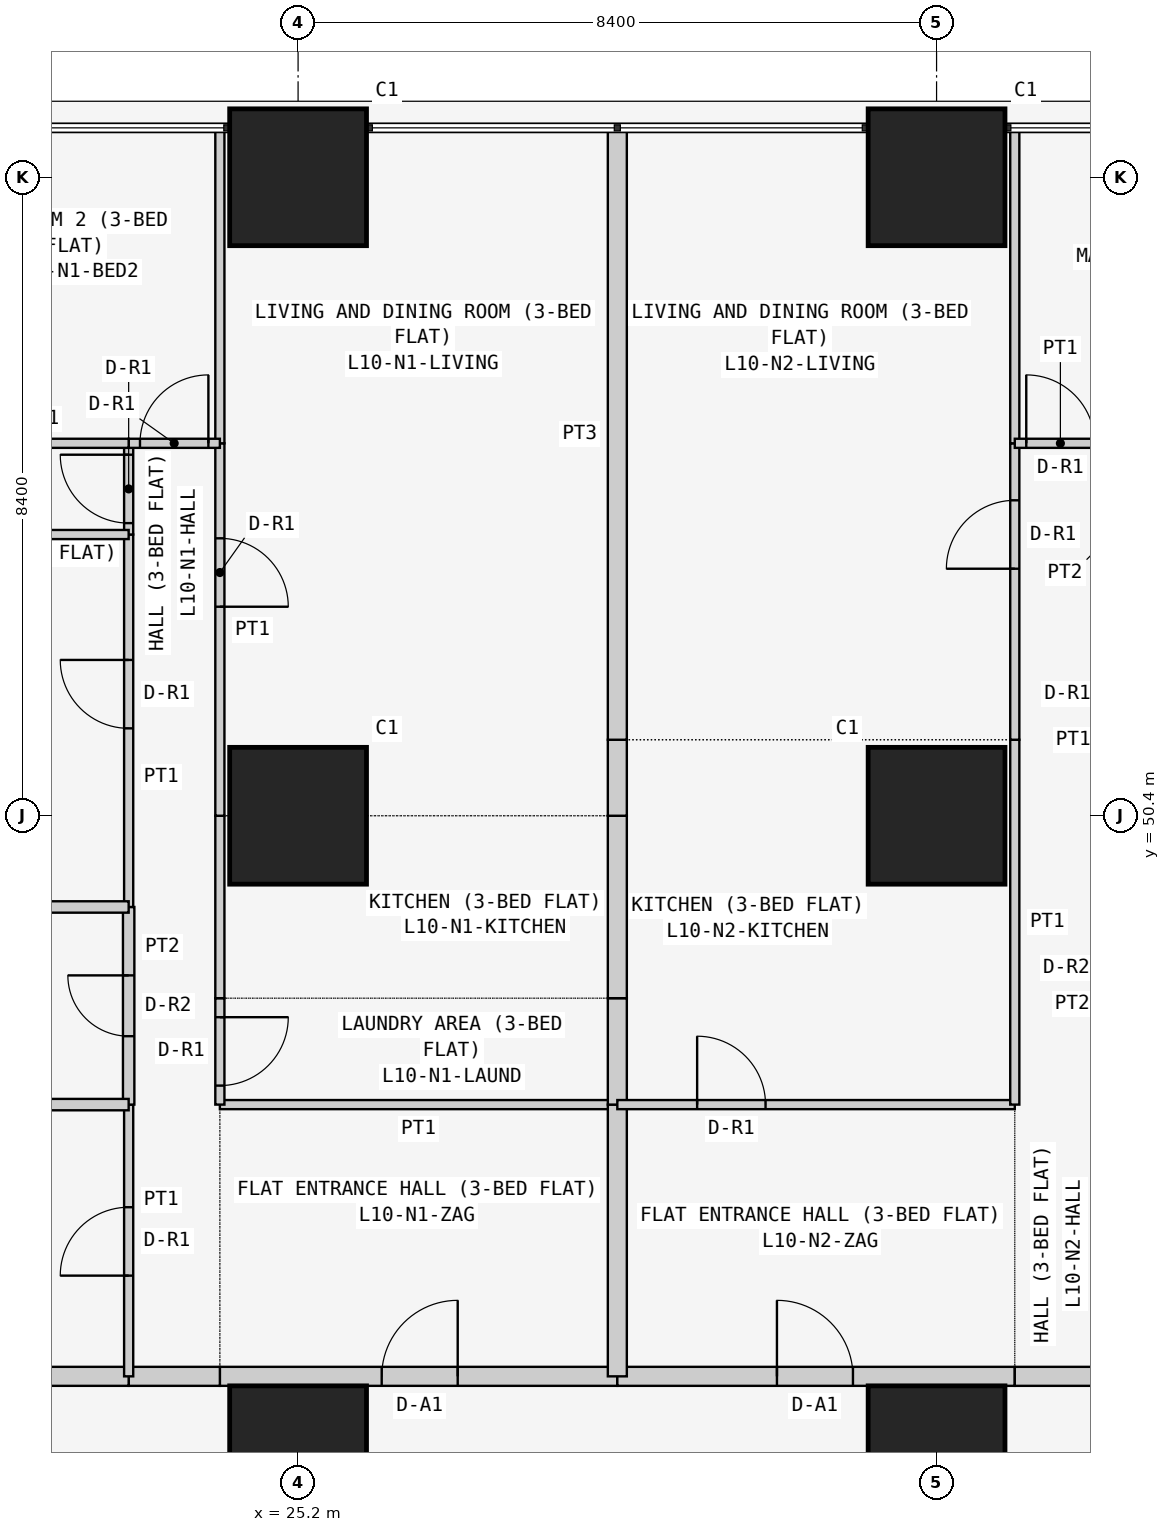
"""IFC4 building model, lengths in metres.
Left out: names, types, materials, properties, quantities, classifications, styles, units other than length and angle.
Written with IfcOpenShell. Run it as: python <this file> out.ifc"""

import sys

from ifc_helpers import new_model, si_unit, direction, frame, frame_2d, origin, origin_2d, place, context, subcontext, project, spatial, rectangle, extrude, element, fill, save


model = new_model("IFC4")
c1 = context("Model", 3, precision=1e-05, world=origin(), true_north=direction((0.0, 1.0)))
c2 = subcontext(c1, "Body", "Model", "MODEL_VIEW")
j1 = project(units=[si_unit("LENGTHUNIT", "METRE"), si_unit("PLANEANGLEUNIT", "RADIAN")], contexts=[c1])
p1 = place(None, origin())
s1 = spatial("IfcSite", under=j1, at=p1, CompositionType="ELEMENT")
p2 = place(p1, origin())
s2 = spatial("IfcBuilding", under=s1, at=p2, CompositionType="ELEMENT")
p3 = place(p2, frame((0.0, 0.0, 45.3)))
s3 = spatial("IfcBuildingStorey", under=s2, at=p3, CompositionType="ELEMENT", Elevation=45.3)
for number, where, z_axis, x_axis in (
    (1, (25.2, 42.0, 0.0), (0.0, 0.0, 1.0), (1.0, 0.0, 0.0)),
    (2, (25.2, 50.4, 0.0), (0.0, 0.0, 1.0), (1.0, 0.0, 0.0)),
    (3, (25.2, 58.8, 0.0), (0.0, 0.0, 1.0), (1.0, 0.0, 0.0)),
    (4, (33.6, 42.0, 0.0), (0.0, 0.0, 1.0), (1.0, 0.0, 0.0)),
    (5, (33.6, 50.4, 0.0), (0.0, 0.0, 1.0), (1.0, 0.0, 0.0)),
    (6, (33.6, 58.8, 0.0), (0.0, 0.0, 1.0), (1.0, 0.0, 0.0)),
):
    element("IfcColumn", number, at=place(p3, frame(where, z_axis=z_axis, x_axis=x_axis)), inside=s3, PredefinedType="COLUMN", context=c2, shape_type="SweptSolid", body=[
        extrude(rectangle(XDim=1.8, YDim=1.8, at=origin_2d()), origin(), (0.0, 0.0, 1.0), 3.6),
    ])
p4 = place(p3, frame((24.171, 43.025, 0.0), z_axis=(0.0, 0.0, 1.0), x_axis=(1.0, 0.0, 0.0)))
e7 = element("IfcWall", 7, at=p4, inside=s3, PredefinedType="PARTITIONING", context=c2, shape_type="SweptSolid", body=[
    extrude(rectangle(XDim=5.229, YDim=0.25, at=frame_2d((2.615, 0.0))), origin(), (0.0, 0.0, 1.0), 3.45),
])
p5 = place(p4, frame((2.129, 0.0, 0.0)))
e8 = element("IfcOpeningElement", 8, at=p5, cuts=e7, PredefinedType="OPENING", context=c2, shape_type="SweptSolid", body=[
    extrude(rectangle(XDim=1.0, YDim=2.1, at=frame_2d((0.5, 1.05))), frame((0.0, 0.135, 0.0), z_axis=(0.0, -1.0, 0.0), x_axis=(1.0, 0.0, 0.0)), (0.0, 0.0, 1.0), 0.27),
])
p6 = place(p3, frame((22.971, 43.025, 0.0), z_axis=(0.0, 0.0, 1.0), x_axis=(1.0, 0.0, 0.0)))
e9 = element("IfcWall", 9, at=p6, inside=s3, PredefinedType="PARTITIONING", context=c2, shape_type="SweptSolid", body=[
    extrude(rectangle(XDim=1.2, YDim=0.25, at=frame_2d((0.6, 0.0))), origin(), (0.0, 0.0, 1.0), 3.45),
])
p7 = place(p3, frame((16.1, 43.025, 0.0), z_axis=(0.0, 0.0, 1.0), x_axis=(1.0, 0.0, 0.0)))
e10 = element("IfcWall", 10, at=p7, inside=s3, PredefinedType="PARTITIONING", context=c2, shape_type="SweptSolid", body=[
    extrude(rectangle(XDim=6.871, YDim=0.25, at=frame_2d((3.436, 0.0))), origin(), (0.0, 0.0, 1.0), 3.45),
])
p8 = place(p3, frame((29.4, 43.025, 0.0), z_axis=(0.0, 0.0, 1.0), x_axis=(1.0, 0.0, 0.0)))
e11 = element("IfcWall", 11, at=p8, inside=s3, PredefinedType="PARTITIONING", context=c2, shape_type="SweptSolid", body=[
    extrude(rectangle(XDim=5.229, YDim=0.25, at=frame_2d((2.615, 0.0))), origin(), (0.0, 0.0, 1.0), 3.45),
])
p9 = place(p8, frame((2.1, 0.0, 0.0)))
e12 = element("IfcOpeningElement", 12, at=p9, cuts=e11, PredefinedType="OPENING", context=c2, shape_type="SweptSolid", body=[
    extrude(rectangle(XDim=1.0, YDim=2.1, at=frame_2d((0.5, 1.05))), frame((0.0, 0.135, 0.0), z_axis=(0.0, -1.0, 0.0), x_axis=(1.0, 0.0, 0.0)), (0.0, 0.0, 1.0), 0.27),
])
p10 = place(p3, frame((34.629, 43.025, 0.0), z_axis=(0.0, 0.0, 1.0), x_axis=(1.0, 0.0, 0.0)))
e13 = element("IfcWall", 13, at=p10, inside=s3, PredefinedType="PARTITIONING", context=c2, shape_type="SweptSolid", body=[
    extrude(rectangle(XDim=1.2, YDim=0.25, at=frame_2d((0.6, 0.0))), origin(), (0.0, 0.0, 1.0), 3.45),
])
p11 = place(p3, frame((29.4, 46.6, 0.0), z_axis=(0.0, 0.0, 1.0), x_axis=(-1.0, 0.0, 0.0)))
e14 = element("IfcWall", 14, at=p11, inside=s3, PredefinedType="PARTITIONING", context=c2, shape_type="SweptSolid", body=[
    extrude(rectangle(XDim=5.229, YDim=0.12, at=frame_2d((2.615, 0.0))), origin(), (0.0, 0.0, 1.0), 3.45),
])
p12 = place(p3, frame((29.4, 43.025, 0.0), z_axis=(0.0, 0.0, 1.0), x_axis=(0.0, 1.0, 0.0)))
e15 = element("IfcWall", 15, at=p12, inside=s3, PredefinedType="PARTITIONING", context=c2, shape_type="SweptSolid", body=[
    extrude(rectangle(XDim=3.575, YDim=0.25, at=frame_2d((1.788, 0.0))), origin(), (0.0, 0.0, 1.0), 2.848),
])
p13 = place(p3, frame((24.171, 48.0, 0.0), z_axis=(0.0, 0.0, 1.0), x_axis=(0.0, -1.0, 0.0)))
e16 = element("IfcWall", 16, at=p13, inside=s3, PredefinedType="PARTITIONING", context=c2, shape_type="SweptSolid", body=[
    extrude(rectangle(XDim=1.4, YDim=0.12, at=frame_2d((0.7, 0.0))), origin(), (0.0, 0.0, 1.0), 3.45),
])
p14 = place(p13, frame((0.25, 0.0, 0.0)))
e17 = element("IfcOpeningElement", 17, at=p14, cuts=e16, PredefinedType="OPENING", context=c2, shape_type="SweptSolid", body=[
    extrude(rectangle(XDim=0.9, YDim=2.1, at=frame_2d((0.45, 1.05))), frame((0.0, 0.07, 0.0), z_axis=(0.0, -1.0, 0.0), x_axis=(1.0, 0.0, 0.0)), (0.0, 0.0, 1.0), 0.14),
])
p15 = place(p3, frame((29.4, 46.6, 0.0), z_axis=(0.0, 0.0, 1.0), x_axis=(0.0, 1.0, 0.0)))
e18 = element("IfcWall", 18, at=p15, inside=s3, PredefinedType="PARTITIONING", context=c2, shape_type="SweptSolid", body=[
    extrude(rectangle(XDim=1.4, YDim=0.25, at=frame_2d((0.7, 0.0))), origin(), (0.0, 0.0, 1.0), 2.848),
])
p16 = place(p3, frame((24.171, 50.4, 0.0), z_axis=(0.0, 0.0, 1.0), x_axis=(0.0, -1.0, 0.0)))
e19 = element("IfcWall", 19, at=p16, inside=s3, PredefinedType="PARTITIONING", context=c2, shape_type="SweptSolid", body=[
    extrude(rectangle(XDim=2.4, YDim=0.12, at=frame_2d((1.2, 0.0))), origin(), (0.0, 0.0, 1.0), 3.45),
])
p17 = place(p3, frame((29.4, 48.0, 0.0), z_axis=(0.0, 0.0, 1.0), x_axis=(0.0, 1.0, 0.0)))
e20 = element("IfcWall", 20, at=p17, inside=s3, PredefinedType="PARTITIONING", context=c2, shape_type="SweptSolid", body=[
    extrude(rectangle(XDim=2.4, YDim=0.25, at=frame_2d((1.2, 0.0))), origin(), (0.0, 0.0, 1.0), 2.848),
])
p18 = place(p3, frame((24.171, 55.3, 0.0), z_axis=(0.0, 0.0, 1.0), x_axis=(0.0, -1.0, 0.0)))
e21 = element("IfcWall", 21, at=p18, inside=s3, PredefinedType="PARTITIONING", context=c2, shape_type="SweptSolid", body=[
    extrude(rectangle(XDim=4.9, YDim=0.12, at=frame_2d((2.45, 0.0))), origin(), (0.0, 0.0, 1.0), 3.45),
])
p19 = place(p18, frame((1.25, 0.0, 0.0)))
e22 = element("IfcOpeningElement", 22, at=p19, cuts=e21, PredefinedType="OPENING", context=c2, shape_type="SweptSolid", body=[
    extrude(rectangle(XDim=0.9, YDim=2.1, at=frame_2d((0.45, 1.05))), frame((0.0, 0.07, 0.0), z_axis=(0.0, -1.0, 0.0), x_axis=(1.0, 0.0, 0.0)), (0.0, 0.0, 1.0), 0.14),
])
p20 = place(p3, frame((24.171, 59.45, 0.0), z_axis=(0.0, 0.0, 1.0), x_axis=(0.0, -1.0, 0.0)))
e23 = element("IfcWall", 23, at=p20, inside=s3, PredefinedType="PARTITIONING", context=c2, shape_type="SweptSolid", body=[
    extrude(rectangle(XDim=4.15, YDim=0.12, at=frame_2d((2.075, 0.0))), origin(), (0.0, 0.0, 1.0), 3.45),
])
p21 = place(p3, frame((29.4, 50.4, 0.0), z_axis=(0.0, 0.0, 1.0), x_axis=(0.0, 1.0, 0.0)))
e24 = element("IfcWall", 24, at=p21, inside=s3, PredefinedType="PARTITIONING", context=c2, shape_type="SweptSolid", body=[
    extrude(rectangle(XDim=1.0, YDim=0.25, at=frame_2d((0.5, 0.0))), origin(), (0.0, 0.0, 1.0), 2.848),
])
p22 = place(p3, frame((29.4, 51.4, 0.0), z_axis=(0.0, 0.0, 1.0), x_axis=(0.0, 1.0, 0.0)))
e25 = element("IfcWall", 25, at=p22, inside=s3, PredefinedType="PARTITIONING", context=c2, shape_type="SweptSolid", body=[
    extrude(rectangle(XDim=8.05, YDim=0.25, at=frame_2d((4.025, 0.0))), origin(), (0.0, 0.0, 1.0), 2.848),
])
p23 = place(p3, frame((22.971, 46.6, 0.0), z_axis=(0.0, 0.0, 1.0), x_axis=(0.0, -1.0, 0.0)))
e26 = element("IfcWall", 26, at=p23, inside=s3, PredefinedType="PARTITIONING", context=c2, shape_type="SweptSolid", body=[
    extrude(rectangle(XDim=3.575, YDim=0.12, at=frame_2d((1.788, 0.0))), origin(), (0.0, 0.0, 1.0), 3.45),
])
p24 = place(p23, frame((1.35, 0.0, 0.0)))
e27 = element("IfcOpeningElement", 27, at=p24, cuts=e26, PredefinedType="OPENING", context=c2, shape_type="SweptSolid", body=[
    extrude(rectangle(XDim=0.9, YDim=2.1, at=frame_2d((0.45, 1.05))), frame((0.0, 0.07, 0.0), z_axis=(0.0, -1.0, 0.0), x_axis=(1.0, 0.0, 0.0)), (0.0, 0.0, 1.0), 0.14),
])
p25 = place(p3, frame((22.971, 49.2, 0.0), z_axis=(0.0, 0.0, 1.0), x_axis=(0.0, -1.0, 0.0)))
e28 = element("IfcWall", 28, at=p25, inside=s3, PredefinedType="PARTITIONING", context=c2, shape_type="SweptSolid", body=[
    extrude(rectangle(XDim=2.6, YDim=0.15, at=frame_2d((1.3, 0.0))), origin(), (0.0, 0.0, 1.0), 3.45),
])
p26 = place(p25, frame((0.9, 0.0, 0.0)))
e29 = element("IfcOpeningElement", 29, at=p26, cuts=e28, PredefinedType="OPENING", context=c2, shape_type="SweptSolid", body=[
    extrude(rectangle(XDim=0.8, YDim=2.1, at=frame_2d((0.4, 1.05))), frame((0.0, 0.085, 0.0), z_axis=(0.0, -1.0, 0.0), x_axis=(1.0, 0.0, 0.0)), (0.0, 0.0, 1.0), 0.17),
])
p27 = place(p3, frame((22.971, 54.1, 0.0), z_axis=(0.0, 0.0, 1.0), x_axis=(0.0, -1.0, 0.0)))
e30 = element("IfcWall", 30, at=p27, inside=s3, PredefinedType="PARTITIONING", context=c2, shape_type="SweptSolid", body=[
    extrude(rectangle(XDim=4.9, YDim=0.12, at=frame_2d((2.45, 0.0))), origin(), (0.0, 0.0, 1.0), 3.45),
])
p28 = place(p27, frame((1.65, 0.0, 0.0)))
e31 = element("IfcOpeningElement", 31, at=p28, cuts=e30, PredefinedType="OPENING", context=c2, shape_type="SweptSolid", body=[
    extrude(rectangle(XDim=0.9, YDim=2.1, at=frame_2d((0.45, 1.05))), frame((0.0, 0.07, 0.0), z_axis=(0.0, -1.0, 0.0), x_axis=(1.0, 0.0, 0.0)), (0.0, 0.0, 1.0), 0.14),
])
p29 = place(p3, frame((22.971, 55.3, 0.0), z_axis=(0.0, 0.0, 1.0), x_axis=(0.0, -1.0, 0.0)))
e32 = element("IfcWall", 32, at=p29, inside=s3, PredefinedType="PARTITIONING", context=c2, shape_type="SweptSolid", body=[
    extrude(rectangle(XDim=1.2, YDim=0.12, at=frame_2d((0.6, 0.0))), origin(), (0.0, 0.0, 1.0), 3.45),
])
p30 = place(p29, frame((0.15, 0.0, 0.0)))
e33 = element("IfcOpeningElement", 33, at=p30, cuts=e32, PredefinedType="OPENING", context=c2, shape_type="SweptSolid", body=[
    extrude(rectangle(XDim=0.9, YDim=2.1, at=frame_2d((0.45, 1.05))), frame((0.0, 0.07, 0.0), z_axis=(0.0, -1.0, 0.0), x_axis=(1.0, 0.0, 0.0)), (0.0, 0.0, 1.0), 0.14),
])
p31 = place(p3, frame((24.171, 55.3, 0.0), z_axis=(0.0, 0.0, 1.0), x_axis=(-1.0, 0.0, 0.0)))
e34 = element("IfcWall", 34, at=p31, inside=s3, PredefinedType="PARTITIONING", context=c2, shape_type="SweptSolid", body=[
    extrude(rectangle(XDim=1.2, YDim=0.12, at=frame_2d((0.6, 0.0))), origin(), (0.0, 0.0, 1.0), 3.45),
])
p32 = place(p31, frame((0.151, 0.0, 0.0)))
e35 = element("IfcOpeningElement", 35, at=p32, cuts=e34, PredefinedType="OPENING", context=c2, shape_type="SweptSolid", body=[
    extrude(rectangle(XDim=0.9, YDim=2.1, at=frame_2d((0.45, 1.05))), frame((0.0, 0.07, 0.0), z_axis=(0.0, -1.0, 0.0), x_axis=(1.0, 0.0, 0.0)), (0.0, 0.0, 1.0), 0.14),
])
for number, where, z_axis, x_axis in (
    (36, (22.971, 46.6, 0.0), (0.0, 0.0, 1.0), (-1.0, 0.0, 0.0)),
    (37, (22.971, 49.2, 0.0), (0.0, 0.0, 1.0), (-1.0, 0.0, 0.0)),
):
    element("IfcWall", number, at=place(p3, frame(where, z_axis=z_axis, x_axis=x_axis)), inside=s3, PredefinedType="PARTITIONING", context=c2, shape_type="SweptSolid", body=[
        extrude(rectangle(XDim=2.971, YDim=0.15, at=frame_2d((1.485, 0.0))), origin(), (0.0, 0.0, 1.0), 3.45),
    ])
for number, where, z_axis, x_axis in (
    (38, (22.971, 54.1, 0.0), (0.0, 0.0, 1.0), (-1.0, 0.0, 0.0)),
    (39, (22.971, 55.3, 0.0), (0.0, 0.0, 1.0), (-1.0, 0.0, 0.0)),
):
    element("IfcWall", number, at=place(p3, frame(where, z_axis=z_axis, x_axis=x_axis)), inside=s3, PredefinedType="PARTITIONING", context=c2, shape_type="SweptSolid", body=[
        extrude(rectangle(XDim=2.285, YDim=0.12, at=frame_2d((1.143, 0.0))), origin(), (0.0, 0.0, 1.0), 3.45),
    ])
p33 = place(p3, frame((29.4, 46.6, 0.0), z_axis=(0.0, 0.0, 1.0), x_axis=(1.0, 0.0, 0.0)))
e40 = element("IfcWall", 40, at=p33, inside=s3, PredefinedType="PARTITIONING", context=c2, shape_type="SweptSolid", body=[
    extrude(rectangle(XDim=5.229, YDim=0.12, at=frame_2d((2.615, 0.0))), origin(), (0.0, 0.0, 1.0), 3.45),
])
p34 = place(p33, frame((1.05, 0.0, 0.0)))
e41 = element("IfcOpeningElement", 41, at=p34, cuts=e40, PredefinedType="OPENING", context=c2, shape_type="SweptSolid", body=[
    extrude(rectangle(XDim=0.9, YDim=2.1, at=frame_2d((0.45, 1.05))), frame((0.0, 0.07, 0.0), z_axis=(0.0, -1.0, 0.0), x_axis=(1.0, 0.0, 0.0)), (0.0, 0.0, 1.0), 0.14),
])
p35 = place(p3, frame((34.629, 51.4, 0.0), z_axis=(0.0, 0.0, 1.0), x_axis=(0.0, -1.0, 0.0)))
e42 = element("IfcWall", 42, at=p35, inside=s3, PredefinedType="PARTITIONING", context=c2, shape_type="SweptSolid", body=[
    extrude(rectangle(XDim=4.8, YDim=0.12, at=frame_2d((2.4, 0.0))), origin(), (0.0, 0.0, 1.0), 3.45),
])
p36 = place(p3, frame((34.629, 55.3, 0.0), z_axis=(0.0, 0.0, 1.0), x_axis=(0.0, -1.0, 0.0)))
e43 = element("IfcWall", 43, at=p36, inside=s3, PredefinedType="PARTITIONING", context=c2, shape_type="SweptSolid", body=[
    extrude(rectangle(XDim=3.9, YDim=0.12, at=frame_2d((1.95, 0.0))), origin(), (0.0, 0.0, 1.0), 3.45),
])
p37 = place(p36, frame((0.75, 0.0, 0.0)))
e44 = element("IfcOpeningElement", 44, at=p37, cuts=e43, PredefinedType="OPENING", context=c2, shape_type="SweptSolid", body=[
    extrude(rectangle(XDim=0.9, YDim=2.1, at=frame_2d((0.45, 1.05))), frame((0.0, 0.07, 0.0), z_axis=(0.0, -1.0, 0.0), x_axis=(1.0, 0.0, 0.0)), (0.0, 0.0, 1.0), 0.14),
])
p38 = place(p3, frame((34.629, 59.45, 0.0), z_axis=(0.0, 0.0, 1.0), x_axis=(0.0, -1.0, 0.0)))
e45 = element("IfcWall", 45, at=p38, inside=s3, PredefinedType="PARTITIONING", context=c2, shape_type="SweptSolid", body=[
    extrude(rectangle(XDim=4.15, YDim=0.12, at=frame_2d((2.075, 0.0))), origin(), (0.0, 0.0, 1.0), 3.45),
])
p39 = place(p3, frame((34.629, 55.3, 0.0), z_axis=(0.0, 0.0, 1.0), x_axis=(1.0, 0.0, 0.0)))
e46 = element("IfcWall", 46, at=p39, inside=s3, PredefinedType="PARTITIONING", context=c2, shape_type="SweptSolid", body=[
    extrude(rectangle(XDim=1.2, YDim=0.12, at=frame_2d((0.6, 0.0))), origin(), (0.0, 0.0, 1.0), 3.45),
])
p40 = place(p39, frame((0.151, 0.0, 0.0)))
e47 = element("IfcOpeningElement", 47, at=p40, cuts=e46, PredefinedType="OPENING", context=c2, shape_type="SweptSolid", body=[
    extrude(rectangle(XDim=0.9, YDim=2.1, at=frame_2d((0.45, 1.05))), frame((0.0, 0.07, 0.0), z_axis=(0.0, -1.0, 0.0), x_axis=(1.0, 0.0, 0.0)), (0.0, 0.0, 1.0), 0.14),
])
p41 = place(p5, origin())
e48 = element("IfcDoor", 48, at=p41, inside=s3, OperationType="SINGLE_SWING_RIGHT", PredefinedType="DOOR", context=c2, shape_type="SweptSolid", body=[
    extrude(rectangle(XDim=1.0, YDim=2.1, at=frame_2d((0.5, 1.05))), frame((0.0, 0.025, 0.0), z_axis=(0.0, -1.0, 0.0), x_axis=(1.0, 0.0, 0.0)), (0.0, 0.0, 1.0), 0.05),
])
fill(e8, e48)
p42 = place(p14, origin())
e49 = element("IfcDoor", 49, at=p42, inside=s3, OperationType="SINGLE_SWING_LEFT", PredefinedType="DOOR", context=c2, shape_type="SweptSolid", body=[
    extrude(rectangle(XDim=0.9, YDim=2.1, at=frame_2d((0.45, 1.05))), frame((0.0, 0.025, 0.0), z_axis=(0.0, -1.0, 0.0), x_axis=(1.0, 0.0, 0.0)), (0.0, 0.0, 1.0), 0.05),
])
fill(e17, e49)
p43 = place(p19, origin())
e50 = element("IfcDoor", 50, at=p43, inside=s3, OperationType="SINGLE_SWING_RIGHT", PredefinedType="DOOR", context=c2, shape_type="SweptSolid", body=[
    extrude(rectangle(XDim=0.9, YDim=2.1, at=frame_2d((0.45, 1.05))), frame((0.0, 0.025, 0.0), z_axis=(0.0, -1.0, 0.0), x_axis=(1.0, 0.0, 0.0)), (0.0, 0.0, 1.0), 0.05),
])
fill(e22, e50)
p44 = place(p24, frame((0.9, 0.0, 0.0), z_axis=(0.0, 0.0, 1.0), x_axis=(-1.0, 0.0, 0.0)))
e51 = element("IfcDoor", 51, at=p44, inside=s3, OperationType="SINGLE_SWING_LEFT", PredefinedType="DOOR", context=c2, shape_type="SweptSolid", body=[
    extrude(rectangle(XDim=0.9, YDim=2.1, at=frame_2d((0.45, 1.05))), frame((0.0, 0.025, 0.0), z_axis=(0.0, -1.0, 0.0), x_axis=(1.0, 0.0, 0.0)), (0.0, 0.0, 1.0), 0.05),
])
fill(e27, e51)
p45 = place(p26, frame((0.8, 0.0, 0.0), z_axis=(0.0, 0.0, 1.0), x_axis=(-1.0, 0.0, 0.0)))
e52 = element("IfcDoor", 52, at=p45, inside=s3, OperationType="SINGLE_SWING_RIGHT", PredefinedType="DOOR", context=c2, shape_type="SweptSolid", body=[
    extrude(rectangle(XDim=0.8, YDim=2.1, at=frame_2d((0.4, 1.05))), frame((0.0, 0.025, 0.0), z_axis=(0.0, -1.0, 0.0), x_axis=(1.0, 0.0, 0.0)), (0.0, 0.0, 1.0), 0.05),
])
fill(e29, e52)
p46 = place(p28, frame((0.9, 0.0, 0.0), z_axis=(0.0, 0.0, 1.0), x_axis=(-1.0, 0.0, 0.0)))
e53 = element("IfcDoor", 53, at=p46, inside=s3, OperationType="SINGLE_SWING_RIGHT", PredefinedType="DOOR", context=c2, shape_type="SweptSolid", body=[
    extrude(rectangle(XDim=0.9, YDim=2.1, at=frame_2d((0.45, 1.05))), frame((0.0, 0.025, 0.0), z_axis=(0.0, -1.0, 0.0), x_axis=(1.0, 0.0, 0.0)), (0.0, 0.0, 1.0), 0.05),
])
fill(e31, e53)
p47 = place(p30, frame((0.9, 0.0, 0.0), z_axis=(0.0, 0.0, 1.0), x_axis=(-1.0, 0.0, 0.0)))
e54 = element("IfcDoor", 54, at=p47, inside=s3, OperationType="SINGLE_SWING_RIGHT", PredefinedType="DOOR", context=c2, shape_type="SweptSolid", body=[
    extrude(rectangle(XDim=0.9, YDim=2.1, at=frame_2d((0.45, 1.05))), frame((0.0, 0.025, 0.0), z_axis=(0.0, -1.0, 0.0), x_axis=(1.0, 0.0, 0.0)), (0.0, 0.0, 1.0), 0.05),
])
fill(e33, e54)
p48 = place(p32, frame((0.9, 0.0, 0.0), z_axis=(0.0, 0.0, 1.0), x_axis=(-1.0, 0.0, 0.0)))
e55 = element("IfcDoor", 55, at=p48, inside=s3, OperationType="SINGLE_SWING_RIGHT", PredefinedType="DOOR", context=c2, shape_type="SweptSolid", body=[
    extrude(rectangle(XDim=0.9, YDim=2.1, at=frame_2d((0.45, 1.05))), frame((0.0, 0.025, 0.0), z_axis=(0.0, -1.0, 0.0), x_axis=(1.0, 0.0, 0.0)), (0.0, 0.0, 1.0), 0.05),
])
fill(e35, e55)
p49 = place(p9, origin())
e56 = element("IfcDoor", 56, at=p49, inside=s3, OperationType="SINGLE_SWING_LEFT", PredefinedType="DOOR", context=c2, shape_type="SweptSolid", body=[
    extrude(rectangle(XDim=1.0, YDim=2.1, at=frame_2d((0.5, 1.05))), frame((0.0, 0.025, 0.0), z_axis=(0.0, -1.0, 0.0), x_axis=(1.0, 0.0, 0.0)), (0.0, 0.0, 1.0), 0.05),
])
fill(e12, e56)
p50 = place(p34, origin())
e57 = element("IfcDoor", 57, at=p50, inside=s3, OperationType="SINGLE_SWING_LEFT", PredefinedType="DOOR", context=c2, shape_type="SweptSolid", body=[
    extrude(rectangle(XDim=0.9, YDim=2.1, at=frame_2d((0.45, 1.05))), frame((0.0, 0.025, 0.0), z_axis=(0.0, -1.0, 0.0), x_axis=(1.0, 0.0, 0.0)), (0.0, 0.0, 1.0), 0.05),
])
fill(e41, e57)
p51 = place(p37, frame((0.9, 0.0, 0.0), z_axis=(0.0, 0.0, 1.0), x_axis=(-1.0, 0.0, 0.0)))
e58 = element("IfcDoor", 58, at=p51, inside=s3, OperationType="SINGLE_SWING_LEFT", PredefinedType="DOOR", context=c2, shape_type="SweptSolid", body=[
    extrude(rectangle(XDim=0.9, YDim=2.1, at=frame_2d((0.45, 1.05))), frame((0.0, 0.025, 0.0), z_axis=(0.0, -1.0, 0.0), x_axis=(1.0, 0.0, 0.0)), (0.0, 0.0, 1.0), 0.05),
])
fill(e44, e58)
p52 = place(p40, origin())
e59 = element("IfcDoor", 59, at=p52, inside=s3, OperationType="SINGLE_SWING_LEFT", PredefinedType="DOOR", context=c2, shape_type="SweptSolid", body=[
    extrude(rectangle(XDim=0.9, YDim=2.1, at=frame_2d((0.45, 1.05))), frame((0.0, 0.025, 0.0), z_axis=(0.0, -1.0, 0.0), x_axis=(1.0, 0.0, 0.0)), (0.0, 0.0, 1.0), 0.05),
])
fill(e47, e59)
save(model, sys.argv[1])
